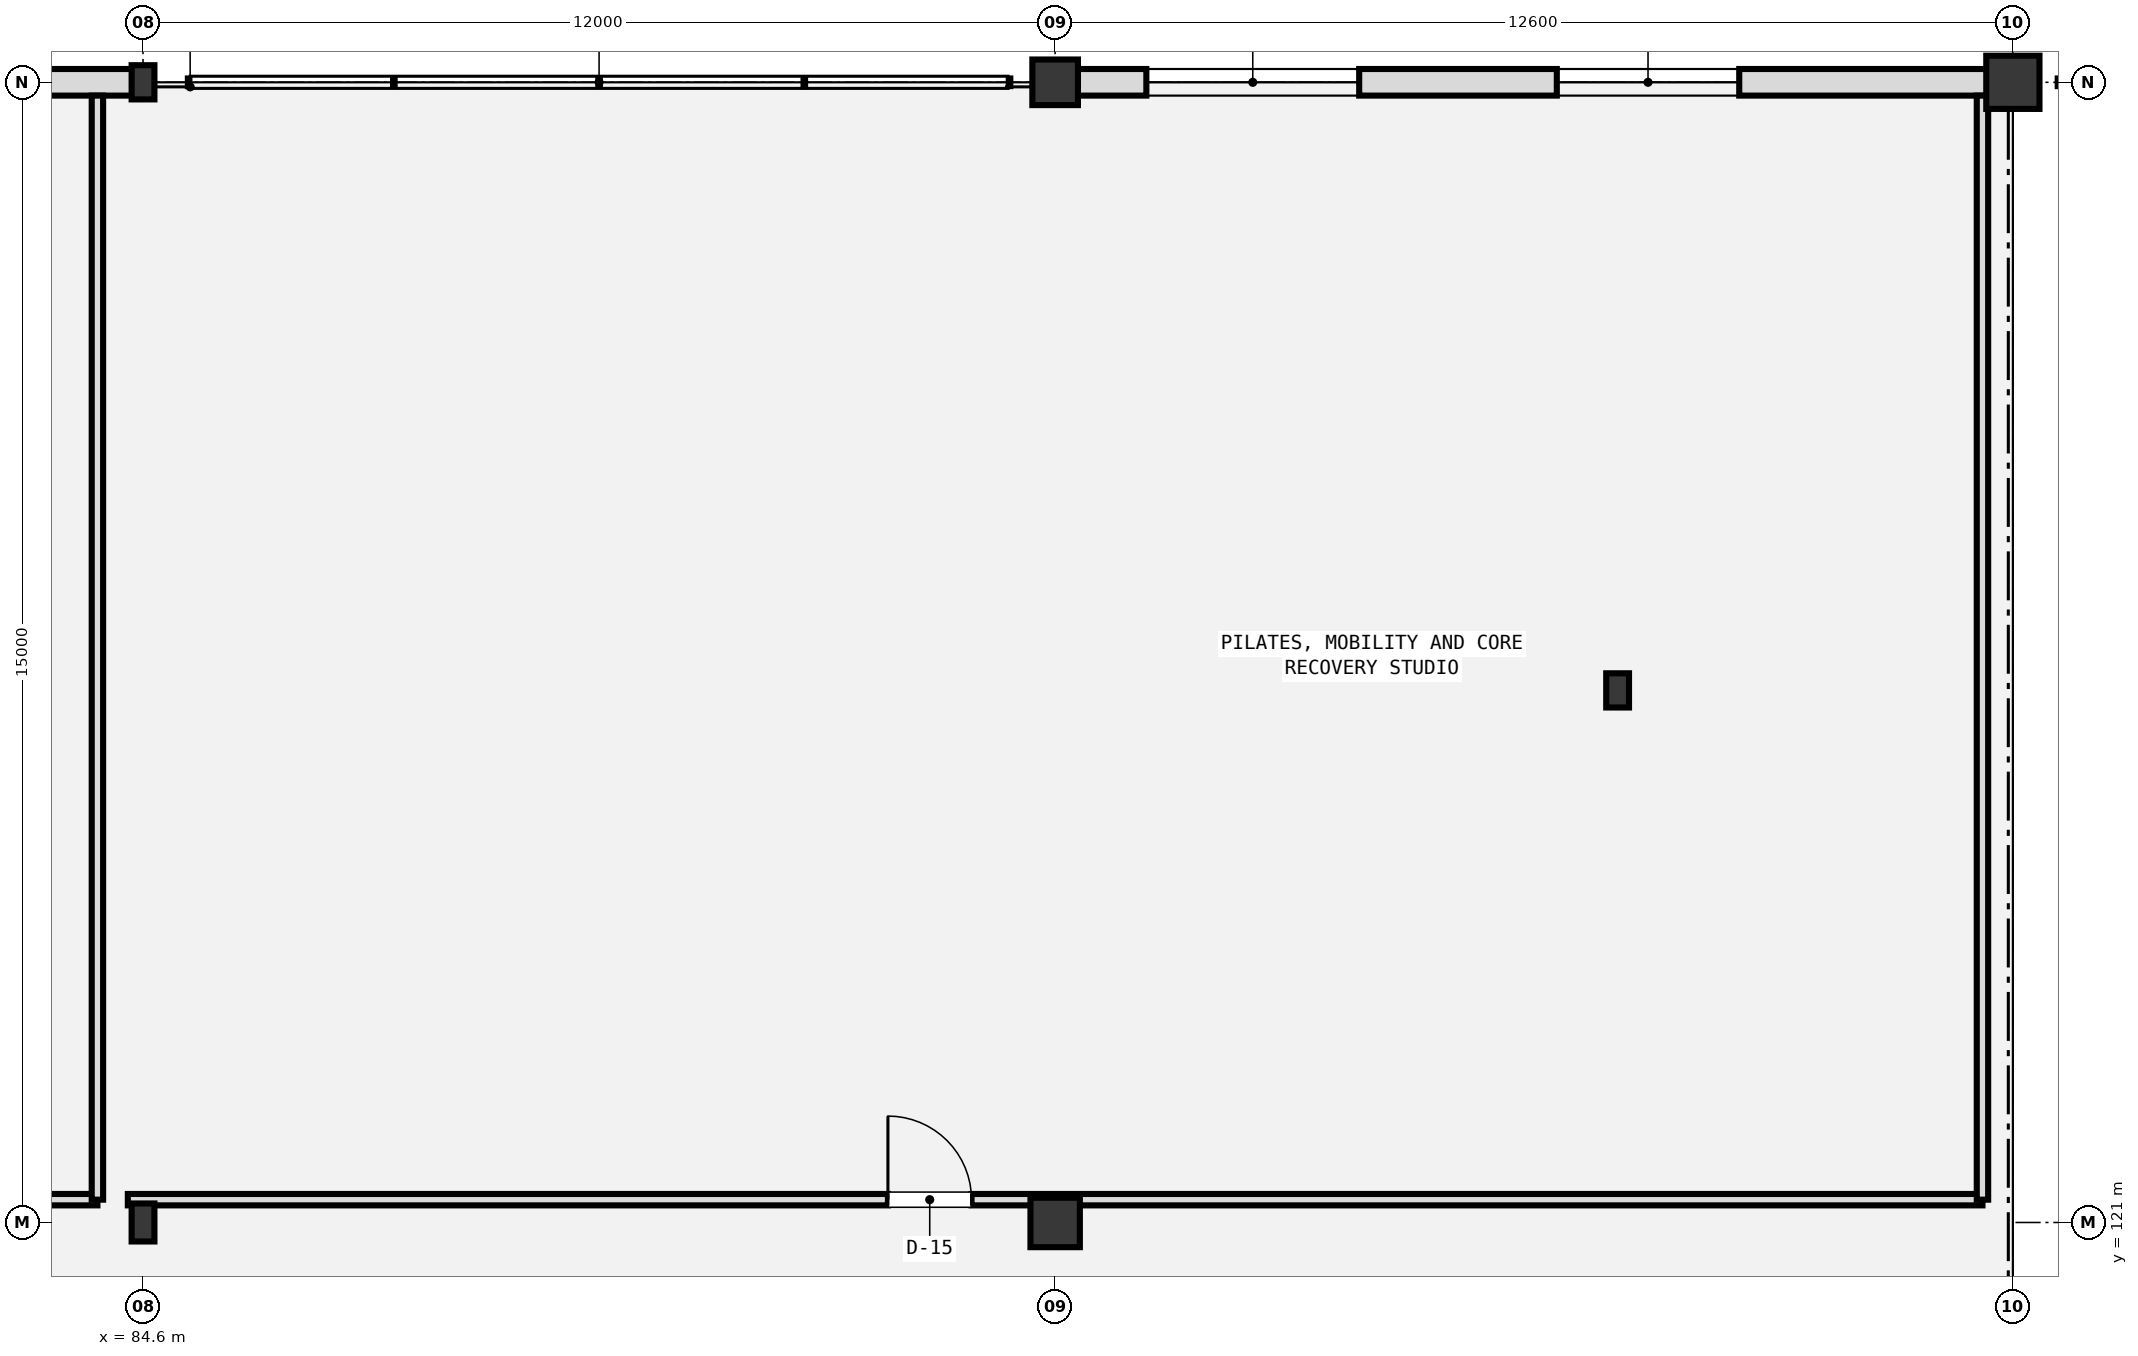
"""IFC4 building model, lengths in metres.
Left out: names, types, materials, properties, quantities, classifications, styles, units other than length and angle.
Written with IfcOpenShell. Run it as: python <this file> out.ifc"""

import sys

from ifc_helpers import new_model, si_unit, direction, frame, frame_2d, origin, origin_2d, place, context, subcontext, project, spatial, rectangle, i_section, extrude, element, fill, save


model = new_model("IFC4")
c1 = context("Model", 3, precision=1e-05, world=origin(), true_north=direction((0.0, 1.0)))
c2 = subcontext(c1, "Body", "Model", "MODEL_VIEW")
j1 = project(units=[si_unit("LENGTHUNIT", "METRE"), si_unit("PLANEANGLEUNIT", "RADIAN")], contexts=[c1])
p1 = place(None, origin())
s1 = spatial("IfcSite", under=j1, at=p1, CompositionType="ELEMENT")
p2 = place(p1, origin())
s2 = spatial("IfcBuilding", under=s1, at=p2, CompositionType="ELEMENT")
p3 = place(p2, frame((0.0, 0.0, 5.4)))
s3 = spatial("IfcBuildingStorey", under=s2, at=p3, CompositionType="ELEMENT", Elevation=5.4)
p4 = place(p3, frame((84.6, 121.0, 0.0), z_axis=(0.0, 0.0, 1.0), x_axis=(1.0, 0.0, 0.0)))
e1 = element("IfcColumn", 1, at=p4, inside=s3, PredefinedType="COLUMN", context=c2, shape_type="SweptSolid", body=[
    extrude(i_section(OverallWidth=0.3, OverallDepth=0.5, WebThickness=0.014, FlangeThickness=0.028, FilletRadius=0.027, at=origin_2d()), origin(), (0.0, 0.0, 1.0), 4.2),
])
p5 = place(p3, frame((84.6, 136.0, 0.0), z_axis=(0.0, 0.0, 1.0), x_axis=(1.0, 0.0, 0.0)))
e2 = element("IfcColumn", 2, at=p5, inside=s3, PredefinedType="COLUMN", context=c2, shape_type="SweptSolid", body=[
    extrude(i_section(OverallWidth=0.3, OverallDepth=0.45, WebThickness=0.014, FlangeThickness=0.026, FilletRadius=0.027, at=origin_2d()), origin(), (0.0, 0.0, 1.0), 4.2),
])
p6 = place(p3, frame((96.6, 121.0, 0.0), z_axis=(0.0, 0.0, 1.0), x_axis=(1.0, 0.0, 0.0)))
e3 = element("IfcColumn", 3, at=p6, inside=s3, PredefinedType="COLUMN", context=c2, shape_type="SweptSolid", body=[
    extrude(rectangle(XDim=0.65, YDim=0.65, at=origin_2d()), origin(), (0.0, 0.0, 1.0), 4.2),
])
p7 = place(p3, frame((96.6, 136.0, 0.0), z_axis=(0.0, 0.0, 1.0), x_axis=(1.0, 0.0, 0.0)))
e4 = element("IfcColumn", 4, at=p7, inside=s3, PredefinedType="COLUMN", context=c2, shape_type="SweptSolid", body=[
    extrude(rectangle(XDim=0.6, YDim=0.6, at=origin_2d()), origin(), (0.0, 0.0, 1.0), 4.2),
])
p8 = place(p3, frame((104.0, 128.0, 0.0), z_axis=(0.0, 0.0, 1.0), x_axis=(1.0, 0.0, 0.0)))
e5 = element("IfcColumn", 5, at=p8, inside=s3, PredefinedType="COLUMN", context=c2, shape_type="SweptSolid", body=[
    extrude(i_section(OverallWidth=0.3, OverallDepth=0.45, WebThickness=0.014, FlangeThickness=0.026, FilletRadius=0.027, at=origin_2d()), origin(), (0.0, 0.0, 1.0), 4.2),
])
p9 = place(p3, frame((109.2, 136.0, 0.0), z_axis=(0.0, 0.0, 1.0), x_axis=(1.0, 0.0, 0.0)))
e6 = element("IfcColumn", 6, at=p9, inside=s3, PredefinedType="COLUMN", context=c2, shape_type="SweptSolid", body=[
    extrude(rectangle(XDim=0.7, YDim=0.7, at=origin_2d()), origin(), (0.0, 0.0, 1.0), 4.2),
])
p10 = place(p3, frame((72.6, 136.0, 0.0), z_axis=(0.0, 0.0, 1.0), x_axis=(1.0, 0.0, 0.0)))
e7 = element("IfcWall", 7, at=p10, inside=s3, PredefinedType="SOLIDWALL", context=c2, shape_type="SweptSolid", body=[
    extrude(rectangle(XDim=12.0, YDim=0.35, at=frame_2d((6.0, 0.0))), origin(), (0.0, 0.0, 1.0), 3.59),
])
p11 = place(p10, frame((1.2, 0.0, 0.95)))
e8 = element("IfcOpeningElement", 8, at=p11, cuts=e7, PredefinedType="OPENING", context=c2, shape_type="SweptSolid", body=[
    extrude(rectangle(XDim=3.6, YDim=1.5, at=frame_2d((1.8, 0.75))), frame((0.0, 0.185, 0.0), z_axis=(0.0, -1.0, 0.0), x_axis=(1.0, 0.0, 0.0)), (0.0, 0.0, 1.0), 0.37),
])
p12 = place(p10, frame((6.6, 0.0, 0.95)))
e9 = element("IfcOpeningElement", 9, at=p12, cuts=e7, PredefinedType="OPENING", context=c2, shape_type="SweptSolid", body=[
    extrude(rectangle(XDim=3.2, YDim=1.5, at=frame_2d((1.6, 0.75))), frame((0.0, 0.185, 0.0), z_axis=(0.0, -1.0, 0.0), x_axis=(1.0, 0.0, 0.0)), (0.0, 0.0, 1.0), 0.37),
])
p13 = place(p3, frame((96.6, 136.0, 0.0), z_axis=(0.0, 0.0, 1.0), x_axis=(1.0, 0.0, 0.0)))
e10 = element("IfcWall", 10, at=p13, inside=s3, PredefinedType="SOLIDWALL", context=c2, shape_type="SweptSolid", body=[
    extrude(rectangle(XDim=12.6, YDim=0.35, at=frame_2d((6.3, 0.0))), origin(), (0.0, 0.0, 1.0), 3.43),
])
p14 = place(p13, frame((1.2, 0.0, 0.95)))
e11 = element("IfcOpeningElement", 11, at=p14, cuts=e10, PredefinedType="OPENING", context=c2, shape_type="SweptSolid", body=[
    extrude(rectangle(XDim=2.8, YDim=1.5, at=frame_2d((1.4, 0.75))), frame((0.0, 0.185, 0.0), z_axis=(0.0, -1.0, 0.0), x_axis=(1.0, 0.0, 0.0)), (0.0, 0.0, 1.0), 0.37),
])
p15 = place(p13, frame((6.6, 0.0, 0.95)))
e12 = element("IfcOpeningElement", 12, at=p15, cuts=e10, PredefinedType="OPENING", context=c2, shape_type="SweptSolid", body=[
    extrude(rectangle(XDim=2.4, YDim=1.5, at=frame_2d((1.2, 0.75))), frame((0.0, 0.185, 0.0), z_axis=(0.0, -1.0, 0.0), x_axis=(1.0, 0.0, 0.0)), (0.0, 0.0, 1.0), 0.37),
])
p16 = place(p3, frame((58.4, 121.3, 0.0), z_axis=(0.0, 0.0, 1.0), x_axis=(1.0, 0.0, 0.0)))
e13 = element("IfcWall", 13, at=p16, inside=s3, PredefinedType="PARTITIONING", context=c2, shape_type="SweptSolid", body=[
    extrude(rectangle(XDim=25.6, YDim=0.15, at=frame_2d((12.8, 0.0))), origin(), (0.0, 0.0, 1.0), 2.7),
])
p17 = place(p16, frame((10.0, 0.0, 0.0)))
e14 = element("IfcOpeningElement", 14, at=p17, cuts=e13, PredefinedType="OPENING", context=c2, shape_type="SweptSolid", body=[
    extrude(rectangle(XDim=1.6, YDim=2.2, at=frame_2d((0.8, 1.1))), frame((0.0, 0.085, 0.0), z_axis=(0.0, -1.0, 0.0), x_axis=(1.0, 0.0, 0.0)), (0.0, 0.0, 1.0), 0.17),
])
p18 = place(p3, frame((84.0, 121.3, 0.0), z_axis=(0.0, 0.0, 1.0), x_axis=(0.0, 1.0, 0.0)))
e15 = element("IfcWall", 15, at=p18, inside=s3, PredefinedType="PARTITIONING", context=c2, shape_type="SweptSolid", body=[
    extrude(rectangle(XDim=14.525, YDim=0.15, at=frame_2d((7.262, 0.0))), origin(), (0.0, 0.0, 1.0), 2.7),
])
p19 = place(p3, frame((84.4, 121.3, 0.0), z_axis=(0.0, 0.0, 1.0), x_axis=(1.0, 0.0, 0.0)))
e16 = element("IfcWall", 16, at=p19, inside=s3, PredefinedType="PARTITIONING", context=c2, shape_type="SweptSolid", body=[
    extrude(rectangle(XDim=24.4, YDim=0.15, at=frame_2d((12.2, 0.0))), origin(), (0.0, 0.0, 1.0), 2.7),
])
p20 = place(p19, frame((10.0, 0.0, 0.0)))
e17 = element("IfcOpeningElement", 17, at=p20, cuts=e16, PredefinedType="OPENING", context=c2, shape_type="SweptSolid", body=[
    extrude(rectangle(XDim=1.1, YDim=2.2, at=frame_2d((0.55, 1.1))), frame((0.0, 0.085, 0.0), z_axis=(0.0, -1.0, 0.0), x_axis=(1.0, 0.0, 0.0)), (0.0, 0.0, 1.0), 0.17),
])
p21 = place(p3, frame((108.8, 121.3, 0.0), z_axis=(0.0, 0.0, 1.0), x_axis=(0.0, 1.0, 0.0)))
e18 = element("IfcWall", 18, at=p21, inside=s3, PredefinedType="PARTITIONING", context=c2, shape_type="SweptSolid", body=[
    extrude(rectangle(XDim=14.525, YDim=0.15, at=frame_2d((7.262, 0.0))), origin(), (0.0, 0.0, 1.0), 2.7),
])
p22 = place(p14, origin())
e19 = element("IfcWindow", 19, at=p22, inside=s3, PartitioningType="DOUBLE_PANEL_HORIZONTAL", PredefinedType="WINDOW", context=c2, shape_type="SweptSolid", body=[
    extrude(rectangle(XDim=2.8, YDim=1.5, at=frame_2d((1.4, 0.75))), frame((0.0, 0.03, 0.0), z_axis=(0.0, -1.0, 0.0), x_axis=(1.0, 0.0, 0.0)), (0.0, 0.0, 1.0), 0.06),
])
fill(e11, e19)
p23 = place(p15, origin())
e20 = element("IfcWindow", 20, at=p23, inside=s3, PartitioningType="DOUBLE_PANEL_VERTICAL", PredefinedType="WINDOW", context=c2, shape_type="SweptSolid", body=[
    extrude(rectangle(XDim=2.4, YDim=1.5, at=frame_2d((1.2, 0.75))), frame((0.0, 0.03, 0.0), z_axis=(0.0, -1.0, 0.0), x_axis=(1.0, 0.0, 0.0)), (0.0, 0.0, 1.0), 0.06),
])
fill(e12, e20)
p24 = place(p20, origin())
e21 = element("IfcDoor", 21, at=p24, inside=s3, OperationType="SINGLE_SWING_LEFT", PredefinedType="DOOR", context=c2, shape_type="SweptSolid", body=[
    extrude(rectangle(XDim=1.1, YDim=2.2, at=frame_2d((0.55, 1.1))), frame((0.0, 0.025, 0.0), z_axis=(0.0, -1.0, 0.0), x_axis=(1.0, 0.0, 0.0)), (0.0, 0.0, 1.0), 0.05),
])
fill(e17, e21)
save(model, sys.argv[1])
